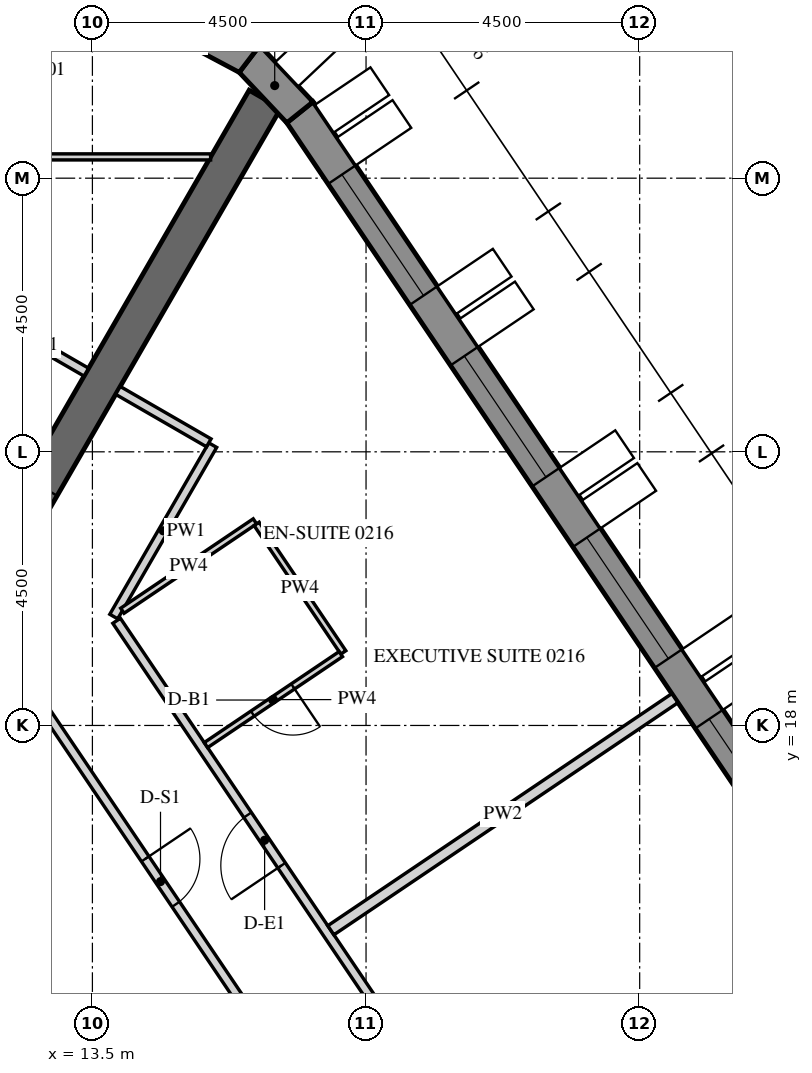
"""IFC4 building model, lengths in metres.
Left out: names, types, materials, properties, quantities, classifications, styles, units other than length and angle.
Written with IfcOpenShell. Run it as: python <this file> out.ifc"""

import sys

from ifc_helpers import new_model, si_unit, direction, frame, frame_2d, origin, place, context, subcontext, project, spatial, polyline, rectangle, outline, extrude, element, fill, save


model = new_model("IFC4")
c1 = context("Model", 3, precision=1e-05, world=origin(), true_north=direction((0.0, 1.0)))
c2 = subcontext(c1, "Body", "Model", "MODEL_VIEW")
j1 = project(units=[si_unit("LENGTHUNIT", "METRE"), si_unit("PLANEANGLEUNIT", "RADIAN")], contexts=[c1])
p1 = place(None, origin())
s1 = spatial("IfcSite", under=j1, at=p1, CompositionType="ELEMENT")
p2 = place(p1, origin())
s2 = spatial("IfcBuilding", under=s1, at=p2, CompositionType="ELEMENT")
p3 = place(p2, frame((0.0, 0.0, 49.2)))
s3 = spatial("IfcBuildingStorey", under=s2, at=p3, CompositionType="ELEMENT", Elevation=49.2)
p4 = place(p3, frame((33.728, 3.153, -0.15), z_axis=(0.0, 0.0, 1.0), x_axis=(-0.559192411416, 0.82903790445, 0.0)))
e1 = element("IfcWall", 1, at=p4, inside=s3, PredefinedType="SOLIDWALL", context=c2, shape_type="SweptSolid", body=[
    extrude(outline(polyline([(-0.026, -0.275), (30.093, -0.275), (30.048, 0.275), (0.026, 0.275), (-0.026, -0.275)])), origin(), (0.0, 0.0, 1.0), 3.9),
])
p5 = place(p4, frame((1.236, 0.0, 1.05)))
e2 = element("IfcOpeningElement", 2, at=p5, cuts=e1, PredefinedType="OPENING", context=c2, shape_type="SweptSolid", body=[
    extrude(rectangle(XDim=2.4, YDim=2.4, at=frame_2d((1.2, 1.2))), frame((0.0, 0.285, 0.0), z_axis=(0.0, -1.0, 0.0), x_axis=(1.0, 0.0, 0.0)), (0.0, 0.0, 1.0), 0.57),
])
p6 = place(p4, frame((4.835, 0.0, 1.05)))
e3 = element("IfcOpeningElement", 3, at=p6, cuts=e1, PredefinedType="OPENING", context=c2, shape_type="SweptSolid", body=[
    extrude(rectangle(XDim=2.4, YDim=2.4, at=frame_2d((1.2, 1.2))), frame((0.0, 0.285, 0.0), z_axis=(0.0, -1.0, 0.0), x_axis=(1.0, 0.0, 0.0)), (0.0, 0.0, 1.0), 0.57),
])
p7 = place(p4, frame((8.436, 0.0, 1.05)))
e4 = element("IfcOpeningElement", 4, at=p7, cuts=e1, PredefinedType="OPENING", context=c2, shape_type="SweptSolid", body=[
    extrude(rectangle(XDim=2.4, YDim=2.4, at=frame_2d((1.2, 1.2))), frame((0.0, 0.285, 0.0), z_axis=(0.0, -1.0, 0.0), x_axis=(1.0, 0.0, 0.0)), (0.0, 0.0, 1.0), 0.57),
])
p8 = place(p4, frame((12.035, 0.0, 1.05)))
e5 = element("IfcOpeningElement", 5, at=p8, cuts=e1, PredefinedType="OPENING", context=c2, shape_type="SweptSolid", body=[
    extrude(rectangle(XDim=2.4, YDim=2.4, at=frame_2d((1.2, 1.2))), frame((0.0, 0.285, 0.0), z_axis=(0.0, -1.0, 0.0), x_axis=(1.0, 0.0, 0.0)), (0.0, 0.0, 1.0), 0.57),
])
p9 = place(p4, frame((15.635, 0.0, 1.05)))
e6 = element("IfcOpeningElement", 6, at=p9, cuts=e1, PredefinedType="OPENING", context=c2, shape_type="SweptSolid", body=[
    extrude(rectangle(XDim=2.4, YDim=2.4, at=frame_2d((1.2, 1.2))), frame((0.0, 0.285, 0.0), z_axis=(0.0, -1.0, 0.0), x_axis=(1.0, 0.0, 0.0)), (0.0, 0.0, 1.0), 0.57),
])
p10 = place(p4, frame((19.236, 0.0, 1.05)))
e7 = element("IfcOpeningElement", 7, at=p10, cuts=e1, PredefinedType="OPENING", context=c2, shape_type="SweptSolid", body=[
    extrude(rectangle(XDim=2.4, YDim=2.4, at=frame_2d((1.2, 1.2))), frame((0.0, 0.285, 0.0), z_axis=(0.0, -1.0, 0.0), x_axis=(1.0, 0.0, 0.0)), (0.0, 0.0, 1.0), 0.57),
])
p11 = place(p4, frame((22.835, 0.0, 1.05)))
e8 = element("IfcOpeningElement", 8, at=p11, cuts=e1, PredefinedType="OPENING", context=c2, shape_type="SweptSolid", body=[
    extrude(rectangle(XDim=2.4, YDim=2.4, at=frame_2d((1.2, 1.2))), frame((0.0, 0.285, 0.0), z_axis=(0.0, -1.0, 0.0), x_axis=(1.0, 0.0, 0.0)), (0.0, 0.0, 1.0), 0.57),
])
p12 = place(p4, frame((26.436, 0.0, 1.05)))
e9 = element("IfcOpeningElement", 9, at=p12, cuts=e1, PredefinedType="OPENING", context=c2, shape_type="SweptSolid", body=[
    extrude(rectangle(XDim=2.4, YDim=2.4, at=frame_2d((1.2, 1.2))), frame((0.0, 0.285, 0.0), z_axis=(0.0, -1.0, 0.0), x_axis=(1.0, 0.0, 0.0)), (0.0, 0.0, 1.0), 0.57),
])
p13 = place(p3, frame((16.913, 28.083, -0.15), z_axis=(0.0, 0.0, 1.0), x_axis=(-0.686196220404, 0.727416488061, 0.0)))
e10 = element("IfcWall", 10, at=p13, inside=s3, PredefinedType="SOLIDWALL", context=c2, shape_type="SweptSolid", body=[
    extrude(outline(polyline([(-0.022, -0.275), (1.253, -0.275), (1.163, 0.275), (0.022, 0.275), (-0.022, -0.275)])), origin(), (0.0, 0.0, 1.0), 3.9),
])
p14 = place(p3, frame((16.083, 28.962, -0.15), z_axis=(0.0, 0.0, 1.0), x_axis=(-0.882995347911, 0.469381737574, 0.0)))
e11 = element("IfcWall", 11, at=p14, inside=s3, PredefinedType="SOLIDWALL", context=c2, shape_type="SweptSolid", body=[
    extrude(outline(polyline([(-0.045, -0.275), (1.253, -0.275), (1.163, 0.275), (0.045, 0.275), (-0.045, -0.275)])), origin(), (0.0, 0.0, 1.0), 3.9),
])
p15 = place(p3, frame((15.819, 0.0, -0.15), z_axis=(0.0, 0.0, 1.0), x_axis=(-0.499999880136, 0.866025472988, 0.0)))
e12 = element("IfcWall", 12, at=p15, inside=s3, PredefinedType="SHEAR", context=c2, shape_type="SweptSolid", body=[
    extrude(outline(polyline([(-0.173, -0.3), (15.993, -0.3), (15.646, 0.3), (0.173, 0.3), (-0.173, -0.3)])), origin(), (0.0, 0.0, 1.0), 3.9),
])
p16 = place(p15, frame((6.981, 0.0, 0.15)))
e13 = element("IfcOpeningElement", 13, at=p16, cuts=e12, PredefinedType="OPENING", context=c2, shape_type="SweptSolid", body=[
    extrude(rectangle(XDim=1.8, YDim=2.4, at=frame_2d((0.9, 1.2))), frame((0.0, 0.31, 0.0), z_axis=(0.0, -1.0, 0.0), x_axis=(1.0, 0.0, 0.0)), (0.0, 0.0, 1.0), 0.62),
])
p17 = place(p3, frame((8.083, 14.0, -0.15), z_axis=(0.0, 0.0, 1.0), x_axis=(0.499997680643, 0.866026742862, 0.0)))
e14 = element("IfcWall", 14, at=p17, inside=s3, PredefinedType="SHEAR", context=c2, shape_type="SweptSolid", body=[
    extrude(rectangle(XDim=16.509, YDim=0.6, at=frame_2d((8.254, 0.0))), origin(), (0.0, 0.0, 1.0), 3.9),
])
p18 = place(p17, frame((7.354, 0.0, 0.15)))
e15 = element("IfcOpeningElement", 15, at=p18, cuts=e14, PredefinedType="OPENING", context=c2, shape_type="SweptSolid", body=[
    extrude(rectangle(XDim=1.8, YDim=2.4, at=frame_2d((0.9, 1.2))), frame((0.0, 0.31, 0.0), z_axis=(0.0, -1.0, 0.0), x_axis=(1.0, 0.0, 0.0)), (0.0, 0.0, 1.0), 0.62),
])
p19 = place(p3, frame((13.4, 23.81, 0.0), z_axis=(0.0, 0.0, 1.0), x_axis=(-0.865989075817, 0.500062916607, 0.0)))
e16 = element("IfcWall", 16, at=p19, inside=s3, PredefinedType="PARTITIONING", context=c2, shape_type="SweptSolid", body=[
    extrude(rectangle(XDim=1.8, YDim=0.15, at=frame_2d((0.9, 0.0))), origin(), (0.0, 0.0, 1.0), 2.988),
])
p20 = place(p3, frame((26.528, 0.997, 0.0), z_axis=(0.0, 0.0, 1.0), x_axis=(-0.559192121846, 0.829038099767, 0.0)))
e17 = element("IfcWall", 17, at=p20, inside=s3, PredefinedType="PARTITIONING", context=c2, shape_type="SweptSolid", body=[
    extrude(rectangle(XDim=22.586, YDim=0.15, at=frame_2d((11.293, 0.0))), origin(), (0.0, 0.0, 1.0), 2.988),
])
p21 = place(p20, frame((11.696, 0.0, 0.0)))
e18 = element("IfcOpeningElement", 18, at=p21, cuts=e17, PredefinedType="OPENING", context=c2, shape_type="SweptSolid", body=[
    extrude(rectangle(XDim=1.0, YDim=2.1, at=frame_2d((0.5, 1.05))), frame((0.0, 0.085, 0.0), z_axis=(0.0, -1.0, 0.0), x_axis=(1.0, 0.0, 0.0)), (0.0, 0.0, 1.0), 0.17),
])
p22 = place(p20, frame((17.733, 0.0, 0.0)))
e19 = element("IfcOpeningElement", 19, at=p22, cuts=e17, PredefinedType="OPENING", context=c2, shape_type="SweptSolid", body=[
    extrude(rectangle(XDim=1.0, YDim=2.1, at=frame_2d((0.5, 1.05))), frame((0.0, 0.085, 0.0), z_axis=(0.0, -1.0, 0.0), x_axis=(1.0, 0.0, 0.0)), (0.0, 0.0, 1.0), 0.17),
])
p23 = place(p3, frame((13.851, 19.791, 0.0), z_axis=(0.0, 0.0, 1.0), x_axis=(0.499986449875, 0.866033226812, 0.0)))
e20 = element("IfcWall", 20, at=p23, inside=s3, PredefinedType="PARTITIONING", context=c2, shape_type="SweptSolid", body=[
    extrude(rectangle(XDim=3.255, YDim=0.15, at=frame_2d((1.628, 0.0))), origin(), (0.0, 0.0, 1.0), 2.988),
])
p24 = place(p3, frame((15.414, 22.648, 0.0), z_axis=(0.0, 0.0, 1.0), x_axis=(-0.866074815912, 0.499914405916, 0.0)))
e21 = element("IfcWall", 21, at=p24, inside=s3, PredefinedType="PARTITIONING", context=c2, shape_type="SweptSolid", body=[
    extrude(rectangle(XDim=1.725, YDim=0.15, at=frame_2d((0.862, 0.0))), origin(), (0.0, 0.0, 1.0), 2.988),
])
p25 = place(p3, frame((11.798, 19.615, 0.0), z_axis=(0.0, 0.0, 1.0), x_axis=(0.559191941468, -0.829038221434, 0.0)))
e22 = element("IfcWall", 22, at=p25, inside=s3, PredefinedType="PARTITIONING", context=c2, shape_type="SweptSolid", body=[
    extrude(rectangle(XDim=10.092, YDim=0.15, at=frame_2d((5.046, 0.0))), origin(), (0.0, 0.0, 1.0), 2.988),
])
p26 = place(p25, frame((4.596, 0.0, 0.0)))
e23 = element("IfcOpeningElement", 23, at=p26, cuts=e22, PredefinedType="OPENING", context=c2, shape_type="SweptSolid", body=[
    extrude(rectangle(XDim=0.9, YDim=2.1, at=frame_2d((0.45, 1.05))), frame((0.0, 0.085, 0.0), z_axis=(0.0, -1.0, 0.0), x_axis=(1.0, 0.0, 0.0)), (0.0, 0.0, 1.0), 0.17),
])
p27 = place(p3, frame((15.444, 27.35, 0.0), z_axis=(0.0, 0.0, 1.0), x_axis=(-1.0, 0.0, 0.0)))
e24 = element("IfcWall", 24, at=p27, inside=s3, PredefinedType="PARTITIONING", context=c2, shape_type="SweptSolid", body=[
    extrude(rectangle(XDim=9.455, YDim=0.1, at=frame_2d((4.728, 0.0))), origin(), (0.0, 0.0, 1.0), 2.988),
])
p28 = place(p27, frame((5.405, 0.0, 0.0)))
e25 = element("IfcOpeningElement", 25, at=p28, cuts=e24, PredefinedType="OPENING", context=c2, shape_type="SweptSolid", body=[
    extrude(rectangle(XDim=0.9, YDim=2.1, at=frame_2d((0.45, 1.05))), frame((0.0, 0.06, 0.0), z_axis=(0.0, -1.0, 0.0), x_axis=(1.0, 0.0, 0.0)), (0.0, 0.0, 1.0), 0.12),
])
p29 = place(p3, frame((23.079, 18.449, 0.0), z_axis=(0.0, 0.0, 1.0), x_axis=(-0.829044361536, -0.559182838261, 0.0)))
e26 = element("IfcWall", 26, at=p29, inside=s3, PredefinedType="PARTITIONING", context=c2, shape_type="SweptSolid", body=[
    extrude(rectangle(XDim=6.825, YDim=0.18, at=frame_2d((3.413, 0.0))), origin(), (0.0, 0.0, 1.0), 2.988),
])
p30 = place(p3, frame((13.993, 19.886, 0.0), z_axis=(0.0, 0.0, 1.0), x_axis=(0.829009051057, 0.559235186005, 0.0)))
e27 = element("IfcWall", 27, at=p30, inside=s3, PredefinedType="PARTITIONING", context=c2, shape_type="SweptSolid", body=[
    extrude(rectangle(XDim=2.629, YDim=0.1, at=frame_2d((1.314, 0.0))), origin(), (0.0, 0.0, 1.0), 2.988),
])
p31 = place(p3, frame((16.2, 21.315, 0.0), z_axis=(0.0, 0.0, 1.0), x_axis=(0.559155442782, -0.829062838878, 0.0)))
e28 = element("IfcWall", 28, at=p31, inside=s3, PredefinedType="PARTITIONING", context=c2, shape_type="SweptSolid", body=[
    extrude(rectangle(XDim=2.55, YDim=0.1, at=frame_2d((1.275, 0.0))), origin(), (0.0, 0.0, 1.0), 2.988),
])
p32 = place(p3, frame((17.585, 19.173, 0.0), z_axis=(0.0, 0.0, 1.0), x_axis=(-0.82904753069, -0.559178139645, 0.0)))
e29 = element("IfcWall", 29, at=p32, inside=s3, PredefinedType="PARTITIONING", context=c2, shape_type="SweptSolid", body=[
    extrude(rectangle(XDim=2.675, YDim=0.1, at=frame_2d((1.337, 0.0))), origin(), (0.0, 0.0, 1.0), 2.988),
])
p33 = place(p32, frame((0.95, 0.0, 0.0)))
e30 = element("IfcOpeningElement", 30, at=p33, cuts=e29, PredefinedType="OPENING", context=c2, shape_type="SweptSolid", body=[
    extrude(rectangle(XDim=0.8, YDim=2.1, at=frame_2d((0.4, 1.05))), frame((0.0, 0.06, 0.0), z_axis=(0.0, -1.0, 0.0), x_axis=(1.0, 0.0, 0.0)), (0.0, 0.0, 1.0), 0.12),
])
p34 = place(p9, frame((0.0, 0.205, 0.0)))
e31 = element("IfcWindow", 31, at=p34, inside=s3, PartitioningType="DOUBLE_PANEL_VERTICAL", PredefinedType="WINDOW", context=c2, shape_type="SweptSolid", body=[
    extrude(rectangle(XDim=2.4, YDim=2.4, at=frame_2d((1.2, 1.2))), frame((0.0, 0.03, 0.0), z_axis=(0.0, -1.0, 0.0), x_axis=(1.0, 0.0, 0.0)), (0.0, 0.0, 1.0), 0.06),
])
fill(e6, e31)
p35 = place(p10, frame((0.0, 0.205, 0.0)))
e32 = element("IfcWindow", 32, at=p35, inside=s3, PartitioningType="DOUBLE_PANEL_VERTICAL", PredefinedType="WINDOW", context=c2, shape_type="SweptSolid", body=[
    extrude(rectangle(XDim=2.4, YDim=2.4, at=frame_2d((1.2, 1.2))), frame((0.0, 0.03, 0.0), z_axis=(0.0, -1.0, 0.0), x_axis=(1.0, 0.0, 0.0)), (0.0, 0.0, 1.0), 0.06),
])
fill(e7, e32)
p36 = place(p11, frame((0.0, 0.205, 0.0)))
e33 = element("IfcWindow", 33, at=p36, inside=s3, PartitioningType="DOUBLE_PANEL_VERTICAL", PredefinedType="WINDOW", context=c2, shape_type="SweptSolid", body=[
    extrude(rectangle(XDim=2.4, YDim=2.4, at=frame_2d((1.2, 1.2))), frame((0.0, 0.03, 0.0), z_axis=(0.0, -1.0, 0.0), x_axis=(1.0, 0.0, 0.0)), (0.0, 0.0, 1.0), 0.06),
])
fill(e8, e33)
p37 = place(p12, frame((0.0, 0.205, 0.0)))
e34 = element("IfcWindow", 34, at=p37, inside=s3, PartitioningType="DOUBLE_PANEL_VERTICAL", PredefinedType="WINDOW", context=c2, shape_type="SweptSolid", body=[
    extrude(rectangle(XDim=2.4, YDim=2.4, at=frame_2d((1.2, 1.2))), frame((0.0, 0.03, 0.0), z_axis=(0.0, -1.0, 0.0), x_axis=(1.0, 0.0, 0.0)), (0.0, 0.0, 1.0), 0.06),
])
fill(e9, e34)
p38 = place(p22, origin())
e35 = element("IfcDoor", 35, at=p38, inside=s3, OperationType="SINGLE_SWING_LEFT", PredefinedType="DOOR", context=c2, shape_type="SweptSolid", body=[
    extrude(rectangle(XDim=1.0, YDim=2.1, at=frame_2d((0.5, 1.05))), frame((0.0, 0.025, 0.0), z_axis=(0.0, -1.0, 0.0), x_axis=(1.0, 0.0, 0.0)), (0.0, 0.0, 1.0), 0.05),
])
fill(e19, e35)
p39 = place(p33, origin())
e36 = element("IfcDoor", 36, at=p39, inside=s3, OperationType="SINGLE_SWING_RIGHT", PredefinedType="DOOR", context=c2, shape_type="SweptSolid", body=[
    extrude(rectangle(XDim=0.8, YDim=2.1, at=frame_2d((0.4, 1.05))), frame((0.0, 0.025, 0.0), z_axis=(0.0, -1.0, 0.0), x_axis=(1.0, 0.0, 0.0)), (0.0, 0.0, 1.0), 0.05),
])
fill(e30, e36)
p40 = place(p26, origin())
e37 = element("IfcDoor", 37, at=p40, inside=s3, OperationType="SINGLE_SWING_LEFT", PredefinedType="DOOR", context=c2, shape_type="SweptSolid", body=[
    extrude(rectangle(XDim=0.9, YDim=2.1, at=frame_2d((0.45, 1.05))), frame((0.0, 0.025, 0.0), z_axis=(0.0, -1.0, 0.0), x_axis=(1.0, 0.0, 0.0)), (0.0, 0.0, 1.0), 0.05),
])
fill(e23, e37)
save(model, sys.argv[1])
